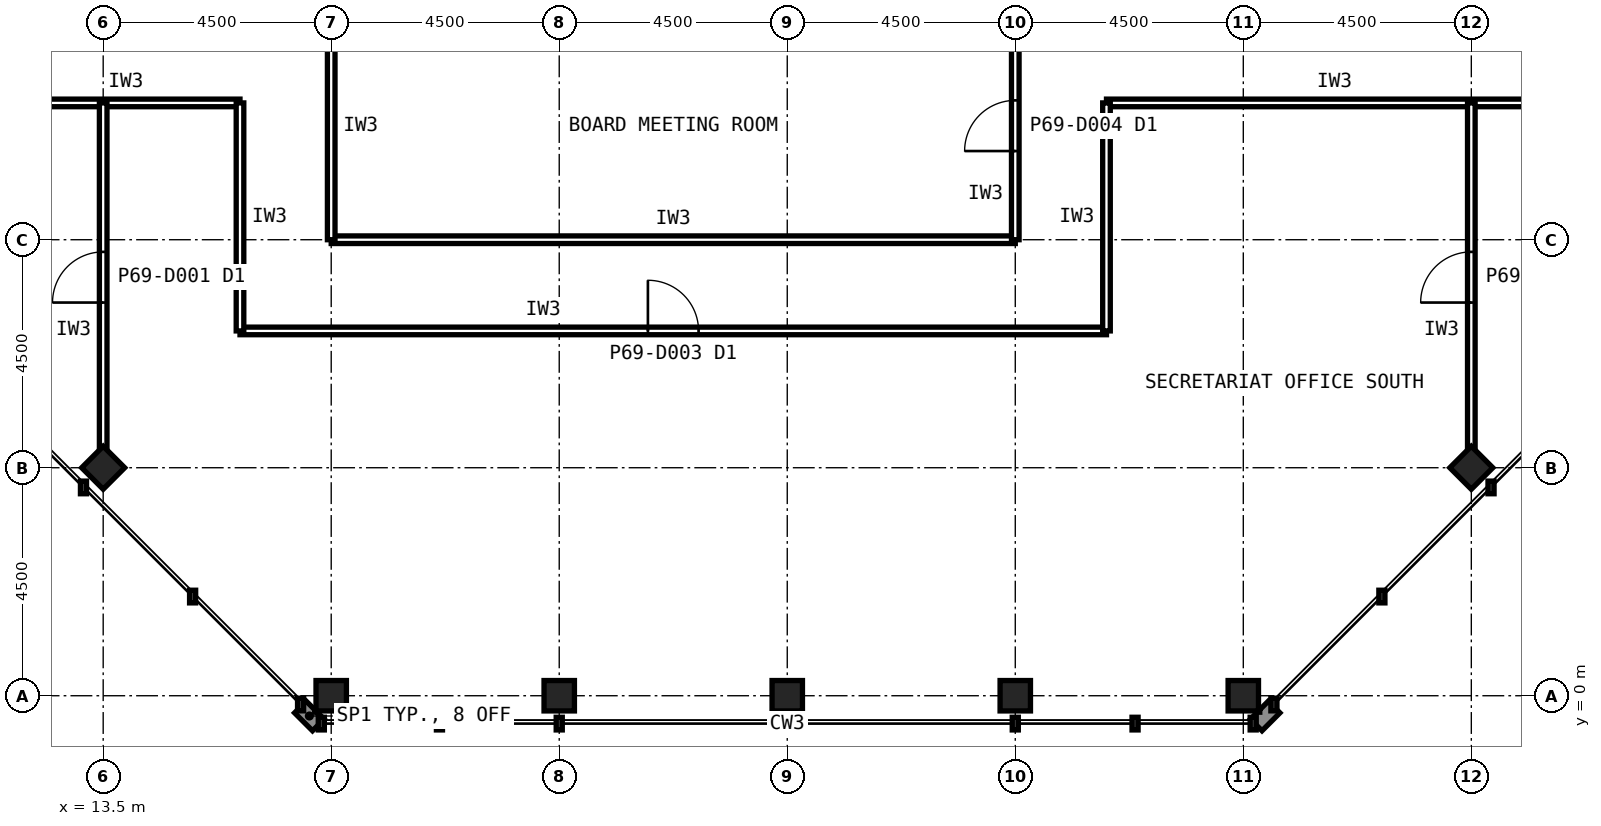
"""IFC4 building model, lengths in metres.
Left out: names, types, materials, properties, quantities, classifications, styles, units other than length and angle.
Written with IfcOpenShell. Run it as: python <this file> out.ifc"""

import sys

from ifc_helpers import new_model, si_unit, direction, frame, frame_2d, origin, origin_2d, place, context, subcontext, project, spatial, rectangle, hollow_rectangle, extrude, element, fill, save


model = new_model("IFC4")
c1 = context("Model", 3, precision=1e-05, world=origin(), true_north=direction((0.0, 1.0)))
c2 = subcontext(c1, "Body", "Model", "MODEL_VIEW")
j1 = project(units=[si_unit("LENGTHUNIT", "METRE"), si_unit("PLANEANGLEUNIT", "RADIAN")], contexts=[c1])
p1 = place(None, origin())
s1 = spatial("IfcSite", under=j1, at=p1, CompositionType="ELEMENT")
p2 = place(p1, origin())
s2 = spatial("IfcBuilding", under=s1, at=p2, CompositionType="ELEMENT")
p3 = place(p2, frame((0.0, 0.0, 286.6)))
s3 = spatial("IfcBuildingStorey", under=s2, at=p3, CompositionType="ELEMENT", Elevation=286.6)
for number, where, z_axis, x_axis in (
    (1, (18.0, 0.0, 0.0), (0.0, 0.0, 1.0), (1.0, 0.0, 0.0)),
    (2, (22.5, 0.0, 0.0), (0.0, 0.0, 1.0), (1.0, 0.0, 0.0)),
    (3, (27.0, 0.0, 0.0), (0.0, 0.0, 1.0), (1.0, 0.0, 0.0)),
    (4, (31.5, 0.0, 0.0), (0.0, 0.0, 1.0), (1.0, 0.0, 0.0)),
    (5, (36.0, 0.0, 0.0), (0.0, 0.0, 1.0), (1.0, 0.0, 0.0)),
    (6, (13.5, 4.5, 0.0), (0.0, 0.0, 1.0), (0.707, 0.707, 0.0)),
    (7, (40.5, 4.5, 0.0), (0.0, 0.0, 1.0), (0.707, 0.707, 0.0)),
):
    element("IfcColumn", number, at=place(p3, frame(where, z_axis=z_axis, x_axis=x_axis)), inside=s3, PredefinedType="COLUMN", context=c2, shape_type="SweptSolid", body=[
        extrude(hollow_rectangle(XDim=0.6, YDim=0.6, WallThickness=0.028, at=origin_2d()), origin(), (0.0, 0.0, 1.0), 4.0),
    ])
p4 = place(p3, frame((16.2, 7.2, 0.0), z_axis=(0.0, 0.0, 1.0), x_axis=(1.0, 0.0, 0.0)))
e8 = element("IfcWall", 8, at=p4, inside=s3, PredefinedType="PARTITIONING", context=c2, shape_type="SweptSolid", body=[
    extrude(rectangle(XDim=17.1, YDim=0.15, at=frame_2d((8.55, 0.0))), origin(), (0.0, 0.0, 1.0), 3.84),
])
p5 = place(p4, frame((8.05, 0.0, 0.0)))
e9 = element("IfcOpeningElement", 9, at=p5, cuts=e8, PredefinedType="OPENING", context=c2, shape_type="SweptSolid", body=[
    extrude(rectangle(XDim=1.0, YDim=2.1, at=frame_2d((0.5, 1.05))), frame((0.0, 0.085, 0.0), z_axis=(0.0, -1.0, 0.0), x_axis=(1.0, 0.0, 0.0)), (0.0, 0.0, 1.0), 0.17),
])
p6 = place(p3, frame((33.3, 11.7, 0.0), z_axis=(0.0, 0.0, 1.0), x_axis=(1.0, 0.0, 0.0)))
e10 = element("IfcWall", 10, at=p6, inside=s3, PredefinedType="PARTITIONING", context=c2, shape_type="SweptSolid", body=[
    extrude(rectangle(XDim=9.0, YDim=0.15, at=frame_2d((4.5, 0.0))), origin(), (0.0, 0.0, 1.0), 3.84),
])
for number, where, z_axis, x_axis in (
    (11, (11.7, 11.7, 0.0), (0.0, 0.0, 1.0), (1.0, 0.0, 0.0)),
    (12, (16.2, 11.7, 0.0), (0.0, 0.0, 1.0), (0.0, -1.0, 0.0)),
    (13, (33.3, 7.2, 0.0), (0.0, 0.0, 1.0), (0.0, 1.0, 0.0)),
):
    element("IfcWall", number, at=place(p3, frame(where, z_axis=z_axis, x_axis=x_axis)), inside=s3, PredefinedType="PARTITIONING", context=c2, shape_type="SweptSolid", body=[
        extrude(rectangle(XDim=4.5, YDim=0.15, at=frame_2d((2.25, 0.0))), origin(), (0.0, 0.0, 1.0), 3.84),
    ])
p7 = place(p3, frame((18.0, 9.0, 0.0), z_axis=(0.0, 0.0, 1.0), x_axis=(1.0, 0.0, 0.0)))
e14 = element("IfcWall", 14, at=p7, inside=s3, PredefinedType="PARTITIONING", context=c2, shape_type="SweptSolid", body=[
    extrude(rectangle(XDim=13.5, YDim=0.15, at=frame_2d((6.75, 0.0))), origin(), (0.0, 0.0, 1.0), 3.84),
])
p8 = place(p3, frame((31.5, 9.0, 0.0), z_axis=(0.0, 0.0, 1.0), x_axis=(0.0, 1.0, 0.0)))
e15 = element("IfcWall", 15, at=p8, inside=s3, PredefinedType="PARTITIONING", context=c2, shape_type="SweptSolid", body=[
    extrude(rectangle(XDim=4.5, YDim=0.15, at=frame_2d((2.25, 0.0))), origin(), (0.0, 0.0, 1.0), 2.989),
])
p9 = place(p8, frame((1.75, 0.0, 0.0)))
e16 = element("IfcOpeningElement", 16, at=p9, cuts=e15, PredefinedType="OPENING", context=c2, shape_type="SweptSolid", body=[
    extrude(rectangle(XDim=1.0, YDim=2.1, at=frame_2d((0.5, 1.05))), frame((0.0, 0.085, 0.0), z_axis=(0.0, -1.0, 0.0), x_axis=(1.0, 0.0, 0.0)), (0.0, 0.0, 1.0), 0.17),
])
p10 = place(p3, frame((18.0, 13.5, 0.0), z_axis=(0.0, 0.0, 1.0), x_axis=(0.0, -1.0, 0.0)))
e17 = element("IfcWall", 17, at=p10, inside=s3, PredefinedType="PARTITIONING", context=c2, shape_type="SweptSolid", body=[
    extrude(rectangle(XDim=4.5, YDim=0.15, at=frame_2d((2.25, 0.0))), origin(), (0.0, 0.0, 1.0), 2.989),
])
p11 = place(p3, frame((40.5, 4.82, 0.0), z_axis=(0.0, 0.0, 1.0), x_axis=(0.0, 1.0, 0.0)))
e18 = element("IfcWall", 18, at=p11, inside=s3, PredefinedType="PARTITIONING", context=c2, shape_type="SweptSolid", body=[
    extrude(rectangle(XDim=6.88, YDim=0.15, at=frame_2d((3.44, 0.0))), origin(), (0.0, 0.0, 1.0), 2.989),
])
p12 = place(p11, frame((2.94, 0.0, 0.0)))
e19 = element("IfcOpeningElement", 19, at=p12, cuts=e18, PredefinedType="OPENING", context=c2, shape_type="SweptSolid", body=[
    extrude(rectangle(XDim=1.0, YDim=2.1, at=frame_2d((0.5, 1.05))), frame((0.0, 0.085, 0.0), z_axis=(0.0, -1.0, 0.0), x_axis=(1.0, 0.0, 0.0)), (0.0, 0.0, 1.0), 0.17),
])
p13 = place(p3, frame((13.5, 4.82, 0.0), z_axis=(0.0, 0.0, 1.0), x_axis=(0.0, 1.0, 0.0)))
e20 = element("IfcWall", 20, at=p13, inside=s3, PredefinedType="PARTITIONING", context=c2, shape_type="SweptSolid", body=[
    extrude(rectangle(XDim=6.88, YDim=0.15, at=frame_2d((3.44, 0.0))), origin(), (0.0, 0.0, 1.0), 2.989),
])
p14 = place(p13, frame((2.94, 0.0, 0.0)))
e21 = element("IfcOpeningElement", 21, at=p14, cuts=e20, PredefinedType="OPENING", context=c2, shape_type="SweptSolid", body=[
    extrude(rectangle(XDim=1.0, YDim=2.1, at=frame_2d((0.5, 1.05))), frame((0.0, 0.085, 0.0), z_axis=(0.0, -1.0, 0.0), x_axis=(1.0, 0.0, 0.0)), (0.0, 0.0, 1.0), 0.17),
])
p15 = place(p5, origin())
e22 = element("IfcDoor", 22, at=p15, inside=s3, OperationType="SINGLE_SWING_LEFT", PredefinedType="DOOR", context=c2, shape_type="SweptSolid", body=[
    extrude(rectangle(XDim=1.0, YDim=2.1, at=frame_2d((0.5, 1.05))), frame((0.0, 0.025, 0.0), z_axis=(0.0, -1.0, 0.0), x_axis=(1.0, 0.0, 0.0)), (0.0, 0.0, 1.0), 0.05),
])
fill(e9, e22)
p16 = place(p9, origin())
e23 = element("IfcDoor", 23, at=p16, inside=s3, OperationType="SINGLE_SWING_LEFT", PredefinedType="DOOR", context=c2, shape_type="SweptSolid", body=[
    extrude(rectangle(XDim=1.0, YDim=2.1, at=frame_2d((0.5, 1.05))), frame((0.0, 0.025, 0.0), z_axis=(0.0, -1.0, 0.0), x_axis=(1.0, 0.0, 0.0)), (0.0, 0.0, 1.0), 0.05),
])
fill(e16, e23)
p17 = place(p12, origin())
e24 = element("IfcDoor", 24, at=p17, inside=s3, OperationType="SINGLE_SWING_LEFT", PredefinedType="DOOR", context=c2, shape_type="SweptSolid", body=[
    extrude(rectangle(XDim=1.0, YDim=2.1, at=frame_2d((0.5, 1.05))), frame((0.0, 0.025, 0.0), z_axis=(0.0, -1.0, 0.0), x_axis=(1.0, 0.0, 0.0)), (0.0, 0.0, 1.0), 0.05),
])
fill(e19, e24)
p18 = place(p14, origin())
e25 = element("IfcDoor", 25, at=p18, inside=s3, OperationType="SINGLE_SWING_LEFT", PredefinedType="DOOR", context=c2, shape_type="SweptSolid", body=[
    extrude(rectangle(XDim=1.0, YDim=2.1, at=frame_2d((0.5, 1.05))), frame((0.0, 0.025, 0.0), z_axis=(0.0, -1.0, 0.0), x_axis=(1.0, 0.0, 0.0)), (0.0, 0.0, 1.0), 0.05),
])
fill(e21, e25)
save(model, sys.argv[1])
